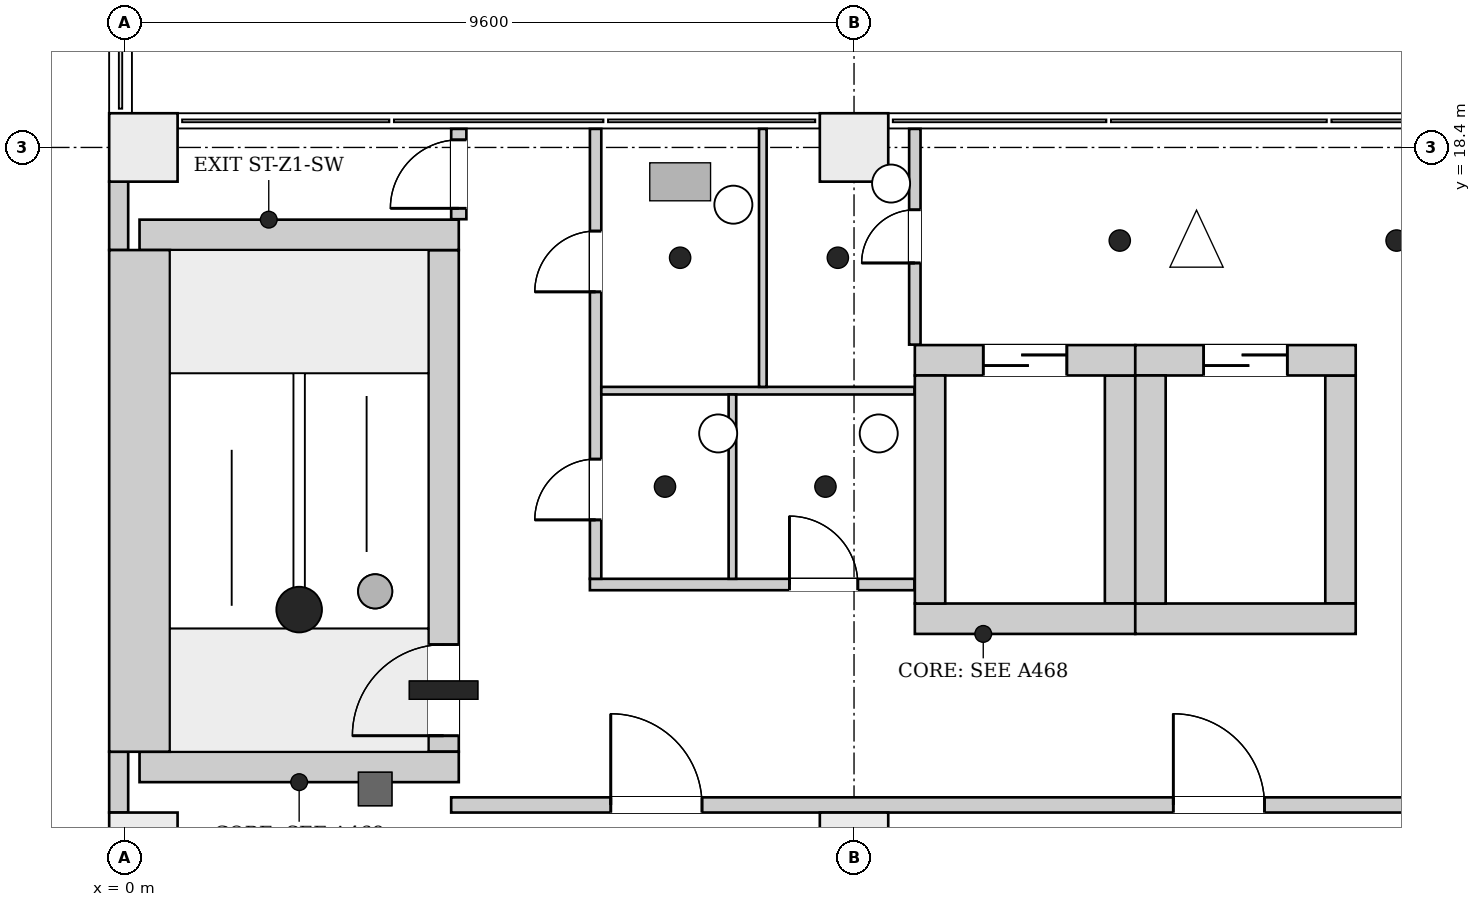
"""IFC4 building model, lengths in metres.
Left out: names, types, materials, properties, quantities, classifications, styles, units other than length and angle.
Written with IfcOpenShell. Run it as: python <this file> out.ifc"""

import sys

from ifc_helpers import new_model, si_unit, direction, frame, frame_2d, origin, origin_2d, place, context, subcontext, project, spatial, rectangle, extrude, element, fill, save


model = new_model("IFC4")
c1 = context("Model", 3, precision=1e-05, world=origin(), true_north=direction((0.0, 1.0)))
c2 = subcontext(c1, "Body", "Model", "MODEL_VIEW")
j1 = project(units=[si_unit("LENGTHUNIT", "METRE"), si_unit("PLANEANGLEUNIT", "RADIAN")], contexts=[c1])
p1 = place(None, origin())
s1 = spatial("IfcSite", under=j1, at=p1, CompositionType="ELEMENT")
p2 = place(p1, origin())
s2 = spatial("IfcBuilding", under=s1, at=p2, CompositionType="ELEMENT")
p3 = place(p2, frame((0.0, 0.0, 36.1)))
s3 = spatial("IfcBuildingStorey", under=s2, at=p3, CompositionType="ELEMENT", Elevation=36.1)
for number, where, z_axis, x_axis in (
    (1, (0.2, 10.25, 0.0), (0.0, 0.0, 1.0), (1.0, 0.0, 0.0)),
    (2, (0.2, 17.25, 0.0), (0.0, 0.0, 1.0), (1.0, 0.0, 0.0)),
):
    element("IfcWall", number, at=place(p3, frame(where, z_axis=z_axis, x_axis=x_axis)), inside=s3, PredefinedType="SHEAR", context=c2, shape_type="SweptSolid", body=[
        extrude(rectangle(XDim=4.2, YDim=0.4, at=frame_2d((2.1, 0.0))), origin(), (0.0, 0.0, 1.0), 4.2),
    ])
p4 = place(p3, frame((0.2, 10.45, 0.0), z_axis=(0.0, 0.0, 1.0), x_axis=(0.0, 1.0, 0.0)))
e3 = element("IfcWall", 3, at=p4, inside=s3, PredefinedType="SHEAR", context=c2, shape_type="SweptSolid", body=[
    extrude(rectangle(XDim=6.6, YDim=0.8, at=frame_2d((3.3, 0.0))), origin(), (0.0, 0.0, 1.0), 4.2),
])
p5 = place(p3, frame((4.2, 10.45, 0.0), z_axis=(0.0, 0.0, 1.0), x_axis=(0.0, 1.0, 0.0)))
e4 = element("IfcWall", 4, at=p5, inside=s3, PredefinedType="SHEAR", context=c2, shape_type="SweptSolid", body=[
    extrude(rectangle(XDim=6.6, YDim=0.4, at=frame_2d((3.3, 0.0))), origin(), (0.0, 0.0, 1.0), 4.2),
])
p6 = place(p5, frame((0.21, 0.0, 0.0)))
e5 = element("IfcOpeningElement", 5, at=p6, cuts=e4, PredefinedType="OPENING", context=c2, shape_type="SweptSolid", body=[
    extrude(rectangle(XDim=1.2, YDim=2.1, at=frame_2d((0.6, 1.05))), frame((0.0, 0.21, 0.0), z_axis=(0.0, -1.0, 0.0), x_axis=(1.0, 0.0, 0.0)), (0.0, 0.0, 1.0), 0.42),
])
p7 = place(p3, frame((10.4, 12.2, 0.0), z_axis=(0.0, 0.0, 1.0), x_axis=(1.0, 0.0, 0.0)))
e6 = element("IfcWall", 6, at=p7, inside=s3, PredefinedType="SHEAR", context=c2, shape_type="SweptSolid", body=[
    extrude(rectangle(XDim=2.9, YDim=0.4, at=frame_2d((1.45, 0.0))), origin(), (0.0, 0.0, 1.0), 4.2),
])
p8 = place(p3, frame((10.4, 15.6, 0.0), z_axis=(0.0, 0.0, 1.0), x_axis=(1.0, 0.0, 0.0)))
e7 = element("IfcWall", 7, at=p8, inside=s3, PredefinedType="SHEAR", context=c2, shape_type="SweptSolid", body=[
    extrude(rectangle(XDim=2.9, YDim=0.4, at=frame_2d((1.45, 0.0))), origin(), (0.0, 0.0, 1.0), 4.2),
])
p9 = place(p8, frame((0.9, 0.0, 0.0)))
e8 = element("IfcOpeningElement", 8, at=p9, cuts=e7, PredefinedType="OPENING", context=c2, shape_type="SweptSolid", body=[
    extrude(rectangle(XDim=1.1, YDim=2.1, at=frame_2d((0.55, 1.05))), frame((0.0, 0.21, 0.0), z_axis=(0.0, -1.0, 0.0), x_axis=(1.0, 0.0, 0.0)), (0.0, 0.0, 1.0), 0.42),
])
for number, where, z_axis, x_axis in (
    (9, (10.6, 12.4, 0.0), (0.0, 0.0, 1.0), (0.0, 1.0, 0.0)),
    (10, (13.1, 12.4, 0.0), (0.0, 0.0, 1.0), (0.0, 1.0, 0.0)),
):
    element("IfcWall", number, at=place(p3, frame(where, z_axis=z_axis, x_axis=x_axis)), inside=s3, PredefinedType="SHEAR", context=c2, shape_type="SweptSolid", body=[
        extrude(rectangle(XDim=3.0, YDim=0.4, at=frame_2d((1.5, 0.0))), origin(), (0.0, 0.0, 1.0), 4.2),
    ])
p10 = place(p3, frame((13.3, 12.2, 0.0), z_axis=(0.0, 0.0, 1.0), x_axis=(1.0, 0.0, 0.0)))
e11 = element("IfcWall", 11, at=p10, inside=s3, PredefinedType="SHEAR", context=c2, shape_type="SweptSolid", body=[
    extrude(rectangle(XDim=2.9, YDim=0.4, at=frame_2d((1.45, 0.0))), origin(), (0.0, 0.0, 1.0), 4.2),
])
p11 = place(p3, frame((13.3, 15.6, 0.0), z_axis=(0.0, 0.0, 1.0), x_axis=(1.0, 0.0, 0.0)))
e12 = element("IfcWall", 12, at=p11, inside=s3, PredefinedType="SHEAR", context=c2, shape_type="SweptSolid", body=[
    extrude(rectangle(XDim=2.9, YDim=0.4, at=frame_2d((1.45, 0.0))), origin(), (0.0, 0.0, 1.0), 4.2),
])
p12 = place(p11, frame((0.9, 0.0, 0.0)))
e13 = element("IfcOpeningElement", 13, at=p12, cuts=e12, PredefinedType="OPENING", context=c2, shape_type="SweptSolid", body=[
    extrude(rectangle(XDim=1.1, YDim=2.1, at=frame_2d((0.55, 1.05))), frame((0.0, 0.21, 0.0), z_axis=(0.0, -1.0, 0.0), x_axis=(1.0, 0.0, 0.0)), (0.0, 0.0, 1.0), 0.42),
])
for number, where, z_axis, x_axis in (
    (14, (13.5, 12.4, 0.0), (0.0, 0.0, 1.0), (0.0, 1.0, 0.0)),
    (15, (16.0, 12.4, 0.0), (0.0, 0.0, 1.0), (0.0, 1.0, 0.0)),
):
    element("IfcWall", number, at=place(p3, frame(where, z_axis=z_axis, x_axis=x_axis)), inside=s3, PredefinedType="SHEAR", context=c2, shape_type="SweptSolid", body=[
        extrude(rectangle(XDim=3.0, YDim=0.4, at=frame_2d((1.5, 0.0))), origin(), (0.0, 0.0, 1.0), 4.2),
    ])
for number, where, z_axis, x_axis in (
    (16, (0.25, 9.2, 0.0), (0.0, 0.0, 1.0), (1.0, 0.0, 0.0)),
    (17, (9.6, 9.2, 0.0), (0.0, 0.0, 1.0), (1.0, 0.0, 0.0)),
    (18, (0.25, 18.4, 0.0), (0.0, 0.0, 1.0), (1.0, 0.0, 0.0)),
    (19, (9.6, 18.4, 0.0), (0.0, 0.0, 1.0), (1.0, 0.0, 0.0)),
):
    element("IfcColumn", number, at=place(p3, frame(where, z_axis=z_axis, x_axis=x_axis)), inside=s3, PredefinedType="COLUMN", context=c2, shape_type="SweptSolid", body=[
        extrude(rectangle(XDim=0.9, YDim=0.9, at=origin_2d()), origin(), (0.0, 0.0, 1.0), 4.2),
    ])
p13 = place(p3, frame((-0.074, 10.45, 0.0), z_axis=(0.0, 0.0, 1.0), x_axis=(0.0, -1.0, 0.0)))
e20 = element("IfcWall", 20, at=p13, inside=s3, PredefinedType="ELEMENTEDWALL", context=c2, shape_type="SweptSolid", body=[
    extrude(rectangle(XDim=0.8, YDim=0.25, at=frame_2d((0.4, 0.0))), origin(), (0.0, 0.0, 1.0), 3.9),
])
p14 = place(p3, frame((-0.074, 17.95, 0.0), z_axis=(0.0, 0.0, 1.0), x_axis=(0.0, -1.0, 0.0)))
e21 = element("IfcWall", 21, at=p14, inside=s3, PredefinedType="ELEMENTEDWALL", context=c2, shape_type="SweptSolid", body=[
    extrude(rectangle(XDim=0.9, YDim=0.25, at=frame_2d((0.45, 0.0))), origin(), (0.0, 0.0, 1.0), 3.9),
])
p15 = place(p3, frame((4.3, 9.75, 0.0), z_axis=(0.0, 0.0, 1.0), x_axis=(1.0, 0.0, 0.0)))
e22 = element("IfcWall", 22, at=p15, inside=s3, PredefinedType="PARTITIONING", context=c2, shape_type="SweptSolid", body=[
    extrude(rectangle(XDim=43.894, YDim=0.2, at=frame_2d((21.947, 0.0))), origin(), (0.0, 0.0, 1.0), 3.9),
])
p16 = place(p15, frame((2.1, 0.0, 0.0)))
e23 = element("IfcOpeningElement", 23, at=p16, cuts=e22, PredefinedType="OPENING", context=c2, shape_type="SweptSolid", body=[
    extrude(rectangle(XDim=1.2, YDim=2.1, at=frame_2d((0.6, 1.05))), frame((0.0, 0.11, 0.0), z_axis=(0.0, -1.0, 0.0), x_axis=(1.0, 0.0, 0.0)), (0.0, 0.0, 1.0), 0.22),
])
p17 = place(p15, frame((9.5, 0.0, 0.0)))
e24 = element("IfcOpeningElement", 24, at=p17, cuts=e22, PredefinedType="OPENING", context=c2, shape_type="SweptSolid", body=[
    extrude(rectangle(XDim=1.2, YDim=2.1, at=frame_2d((0.6, 1.05))), frame((0.0, 0.11, 0.0), z_axis=(0.0, -1.0, 0.0), x_axis=(1.0, 0.0, 0.0)), (0.0, 0.0, 1.0), 0.22),
])
p18 = place(p15, frame((19.1, 0.0, 0.0)))
e25 = element("IfcOpeningElement", 25, at=p18, cuts=e22, PredefinedType="OPENING", context=c2, shape_type="SweptSolid", body=[
    extrude(rectangle(XDim=1.2, YDim=2.1, at=frame_2d((0.6, 1.05))), frame((0.0, 0.11, 0.0), z_axis=(0.0, -1.0, 0.0), x_axis=(1.0, 0.0, 0.0)), (0.0, 0.0, 1.0), 0.22),
])
p19 = place(p15, frame((28.7, 0.0, 0.0)))
e26 = element("IfcOpeningElement", 26, at=p19, cuts=e22, PredefinedType="OPENING", context=c2, shape_type="SweptSolid", body=[
    extrude(rectangle(XDim=1.2, YDim=2.1, at=frame_2d((0.6, 1.05))), frame((0.0, 0.11, 0.0), z_axis=(0.0, -1.0, 0.0), x_axis=(1.0, 0.0, 0.0)), (0.0, 0.0, 1.0), 0.22),
])
p20 = place(p15, frame((38.4, 0.0, 0.0)))
e27 = element("IfcOpeningElement", 27, at=p20, cuts=e22, PredefinedType="OPENING", context=c2, shape_type="SweptSolid", body=[
    extrude(rectangle(XDim=1.2, YDim=2.1, at=frame_2d((0.6, 1.05))), frame((0.0, 0.11, 0.0), z_axis=(0.0, -1.0, 0.0), x_axis=(1.0, 0.0, 0.0)), (0.0, 0.0, 1.0), 0.22),
])
p21 = place(p3, frame((4.4, 17.456, 0.0), z_axis=(0.0, 0.0, 1.0), x_axis=(0.0, 1.0, 0.0)))
e28 = element("IfcWall", 28, at=p21, inside=s3, PredefinedType="PARTITIONING", context=c2, shape_type="SweptSolid", body=[
    extrude(rectangle(XDim=1.188, YDim=0.2, at=frame_2d((0.594, 0.0))), origin(), (0.0, 0.0, 1.0), 3.9),
])
p22 = place(p21, frame((0.144, 0.0, 0.0)))
e29 = element("IfcOpeningElement", 29, at=p22, cuts=e28, PredefinedType="OPENING", context=c2, shape_type="SweptSolid", body=[
    extrude(rectangle(XDim=0.9, YDim=2.1, at=frame_2d((0.45, 1.05))), frame((0.0, 0.11, 0.0), z_axis=(0.0, -1.0, 0.0), x_axis=(1.0, 0.0, 0.0)), (0.0, 0.0, 1.0), 0.22),
])
p23 = place(p3, frame((6.125, 12.65, 0.0), z_axis=(0.0, 0.0, 1.0), x_axis=(1.0, 0.0, 0.0)))
e30 = element("IfcWall", 30, at=p23, inside=s3, PredefinedType="PARTITIONING", context=c2, shape_type="SweptSolid", body=[
    extrude(rectangle(XDim=4.269, YDim=0.15, at=frame_2d((2.135, 0.0))), origin(), (0.0, 0.0, 1.0), 3.9),
])
p24 = place(p23, frame((2.625, 0.0, 0.0)))
e31 = element("IfcOpeningElement", 31, at=p24, cuts=e30, PredefinedType="OPENING", context=c2, shape_type="SweptSolid", body=[
    extrude(rectangle(XDim=0.9, YDim=2.1, at=frame_2d((0.45, 1.05))), frame((0.0, 0.085, 0.0), z_axis=(0.0, -1.0, 0.0), x_axis=(1.0, 0.0, 0.0)), (0.0, 0.0, 1.0), 0.17),
])
p25 = place(p3, frame((6.2, 12.725, 0.0), z_axis=(0.0, 0.0, 1.0), x_axis=(0.0, 1.0, 0.0)))
e32 = element("IfcWall", 32, at=p25, inside=s3, PredefinedType="PARTITIONING", context=c2, shape_type="SweptSolid", body=[
    extrude(rectangle(XDim=5.919, YDim=0.15, at=frame_2d((2.959, 0.0))), origin(), (0.0, 0.0, 1.0), 3.9),
])
p26 = place(p25, frame((0.775, 0.0, 0.0)))
e33 = element("IfcOpeningElement", 33, at=p26, cuts=e32, PredefinedType="OPENING", context=c2, shape_type="SweptSolid", body=[
    extrude(rectangle(XDim=0.8, YDim=2.1, at=frame_2d((0.4, 1.05))), frame((0.0, 0.085, 0.0), z_axis=(0.0, -1.0, 0.0), x_axis=(1.0, 0.0, 0.0)), (0.0, 0.0, 1.0), 0.17),
])
p27 = place(p25, frame((3.775, 0.0, 0.0)))
e34 = element("IfcOpeningElement", 34, at=p27, cuts=e32, PredefinedType="OPENING", context=c2, shape_type="SweptSolid", body=[
    extrude(rectangle(XDim=0.8, YDim=2.1, at=frame_2d((0.4, 1.05))), frame((0.0, 0.085, 0.0), z_axis=(0.0, -1.0, 0.0), x_axis=(1.0, 0.0, 0.0)), (0.0, 0.0, 1.0), 0.17),
])
p28 = place(p3, frame((6.275, 15.2, 0.0), z_axis=(0.0, 0.0, 1.0), x_axis=(1.0, 0.0, 0.0)))
e35 = element("IfcWall", 35, at=p28, inside=s3, PredefinedType="PARTITIONING", context=c2, shape_type="SweptSolid", body=[
    extrude(rectangle(XDim=4.119, YDim=0.1, at=frame_2d((2.06, 0.0))), origin(), (0.0, 0.0, 1.0), 3.9),
])
p29 = place(p3, frame((8.0, 12.725, 0.0), z_axis=(0.0, 0.0, 1.0), x_axis=(0.0, 1.0, 0.0)))
e36 = element("IfcWall", 36, at=p29, inside=s3, PredefinedType="PARTITIONING", context=c2, shape_type="SweptSolid", body=[
    extrude(rectangle(XDim=2.425, YDim=0.1, at=frame_2d((1.212, 0.0))), origin(), (0.0, 0.0, 1.0), 3.9),
])
p30 = place(p3, frame((8.4, 15.25, 0.0), z_axis=(0.0, 0.0, 1.0), x_axis=(0.0, 1.0, 0.0)))
e37 = element("IfcWall", 37, at=p30, inside=s3, PredefinedType="PARTITIONING", context=c2, shape_type="SweptSolid", body=[
    extrude(rectangle(XDim=3.394, YDim=0.1, at=frame_2d((1.697, 0.0))), origin(), (0.0, 0.0, 1.0), 3.9),
])
p31 = place(p3, frame((10.4, 15.806, 0.0), z_axis=(0.0, 0.0, 1.0), x_axis=(0.0, 1.0, 0.0)))
e38 = element("IfcWall", 38, at=p31, inside=s3, PredefinedType="PARTITIONING", context=c2, shape_type="SweptSolid", body=[
    extrude(rectangle(XDim=2.838, YDim=0.15, at=frame_2d((1.419, 0.0))), origin(), (0.0, 0.0, 1.0), 3.9),
])
p32 = place(p31, frame((1.074, 0.0, 0.0)))
e39 = element("IfcOpeningElement", 39, at=p32, cuts=e38, PredefinedType="OPENING", context=c2, shape_type="SweptSolid", body=[
    extrude(rectangle(XDim=0.7, YDim=2.1, at=frame_2d((0.35, 1.05))), frame((0.0, 0.085, 0.0), z_axis=(0.0, -1.0, 0.0), x_axis=(1.0, 0.0, 0.0)), (0.0, 0.0, 1.0), 0.17),
])
p33 = place(p6, origin())
e40 = element("IfcDoor", 40, at=p33, inside=s3, OperationType="SINGLE_SWING_RIGHT", PredefinedType="DOOR", context=c2, shape_type="SweptSolid", body=[
    extrude(rectangle(XDim=1.2, YDim=2.1, at=frame_2d((0.6, 1.05))), frame((0.0, 0.025, 0.0), z_axis=(0.0, -1.0, 0.0), x_axis=(1.0, 0.0, 0.0)), (0.0, 0.0, 1.0), 0.05),
])
fill(e5, e40)
p34 = place(p9, origin())
e41 = element("IfcDoor", 41, at=p34, inside=s3, OperationType="DOUBLE_DOOR_SLIDING", PredefinedType="DOOR", context=c2, shape_type="SweptSolid", body=[
    extrude(rectangle(XDim=1.1, YDim=2.1, at=frame_2d((0.55, 1.05))), frame((0.0, 0.025, 0.0), z_axis=(0.0, -1.0, 0.0), x_axis=(1.0, 0.0, 0.0)), (0.0, 0.0, 1.0), 0.05),
])
fill(e8, e41)
p35 = place(p12, origin())
e42 = element("IfcDoor", 42, at=p35, inside=s3, OperationType="DOUBLE_DOOR_SLIDING", PredefinedType="DOOR", context=c2, shape_type="SweptSolid", body=[
    extrude(rectangle(XDim=1.1, YDim=2.1, at=frame_2d((0.55, 1.05))), frame((0.0, 0.025, 0.0), z_axis=(0.0, -1.0, 0.0), x_axis=(1.0, 0.0, 0.0)), (0.0, 0.0, 1.0), 0.05),
])
fill(e13, e42)
p36 = place(p22, origin())
e43 = element("IfcDoor", 43, at=p36, inside=s3, OperationType="SINGLE_SWING_LEFT", PredefinedType="DOOR", context=c2, shape_type="SweptSolid", body=[
    extrude(rectangle(XDim=0.9, YDim=2.1, at=frame_2d((0.45, 1.05))), frame((0.0, 0.025, 0.0), z_axis=(0.0, -1.0, 0.0), x_axis=(1.0, 0.0, 0.0)), (0.0, 0.0, 1.0), 0.05),
])
fill(e29, e43)
p37 = place(p26, origin())
e44 = element("IfcDoor", 44, at=p37, inside=s3, OperationType="SINGLE_SWING_LEFT", PredefinedType="DOOR", context=c2, shape_type="SweptSolid", body=[
    extrude(rectangle(XDim=0.8, YDim=2.1, at=frame_2d((0.4, 1.05))), frame((0.0, 0.025, 0.0), z_axis=(0.0, -1.0, 0.0), x_axis=(1.0, 0.0, 0.0)), (0.0, 0.0, 1.0), 0.05),
])
fill(e33, e44)
p38 = place(p24, origin())
e45 = element("IfcDoor", 45, at=p38, inside=s3, OperationType="SINGLE_SWING_RIGHT", PredefinedType="DOOR", context=c2, shape_type="SweptSolid", body=[
    extrude(rectangle(XDim=0.9, YDim=2.1, at=frame_2d((0.45, 1.05))), frame((0.0, 0.025, 0.0), z_axis=(0.0, -1.0, 0.0), x_axis=(1.0, 0.0, 0.0)), (0.0, 0.0, 1.0), 0.05),
])
fill(e31, e45)
p39 = place(p27, origin())
e46 = element("IfcDoor", 46, at=p39, inside=s3, OperationType="SINGLE_SWING_LEFT", PredefinedType="DOOR", context=c2, shape_type="SweptSolid", body=[
    extrude(rectangle(XDim=0.8, YDim=2.1, at=frame_2d((0.4, 1.05))), frame((0.0, 0.025, 0.0), z_axis=(0.0, -1.0, 0.0), x_axis=(1.0, 0.0, 0.0)), (0.0, 0.0, 1.0), 0.05),
])
fill(e34, e46)
p40 = place(p32, origin())
e47 = element("IfcDoor", 47, at=p40, inside=s3, OperationType="SINGLE_SWING_LEFT", PredefinedType="DOOR", context=c2, shape_type="SweptSolid", body=[
    extrude(rectangle(XDim=0.7, YDim=2.1, at=frame_2d((0.35, 1.05))), frame((0.0, 0.025, 0.0), z_axis=(0.0, -1.0, 0.0), x_axis=(1.0, 0.0, 0.0)), (0.0, 0.0, 1.0), 0.05),
])
fill(e39, e47)
p41 = place(p16, origin())
e48 = element("IfcDoor", 48, at=p41, inside=s3, OperationType="SINGLE_SWING_RIGHT", PredefinedType="DOOR", context=c2, shape_type="SweptSolid", body=[
    extrude(rectangle(XDim=1.2, YDim=2.1, at=frame_2d((0.6, 1.05))), frame((0.0, 0.025, 0.0), z_axis=(0.0, -1.0, 0.0), x_axis=(1.0, 0.0, 0.0)), (0.0, 0.0, 1.0), 0.05),
])
fill(e23, e48)
p42 = place(p17, origin())
e49 = element("IfcDoor", 49, at=p42, inside=s3, OperationType="SINGLE_SWING_RIGHT", PredefinedType="DOOR", context=c2, shape_type="SweptSolid", body=[
    extrude(rectangle(XDim=1.2, YDim=2.1, at=frame_2d((0.6, 1.05))), frame((0.0, 0.025, 0.0), z_axis=(0.0, -1.0, 0.0), x_axis=(1.0, 0.0, 0.0)), (0.0, 0.0, 1.0), 0.05),
])
fill(e24, e49)
save(model, sys.argv[1])
